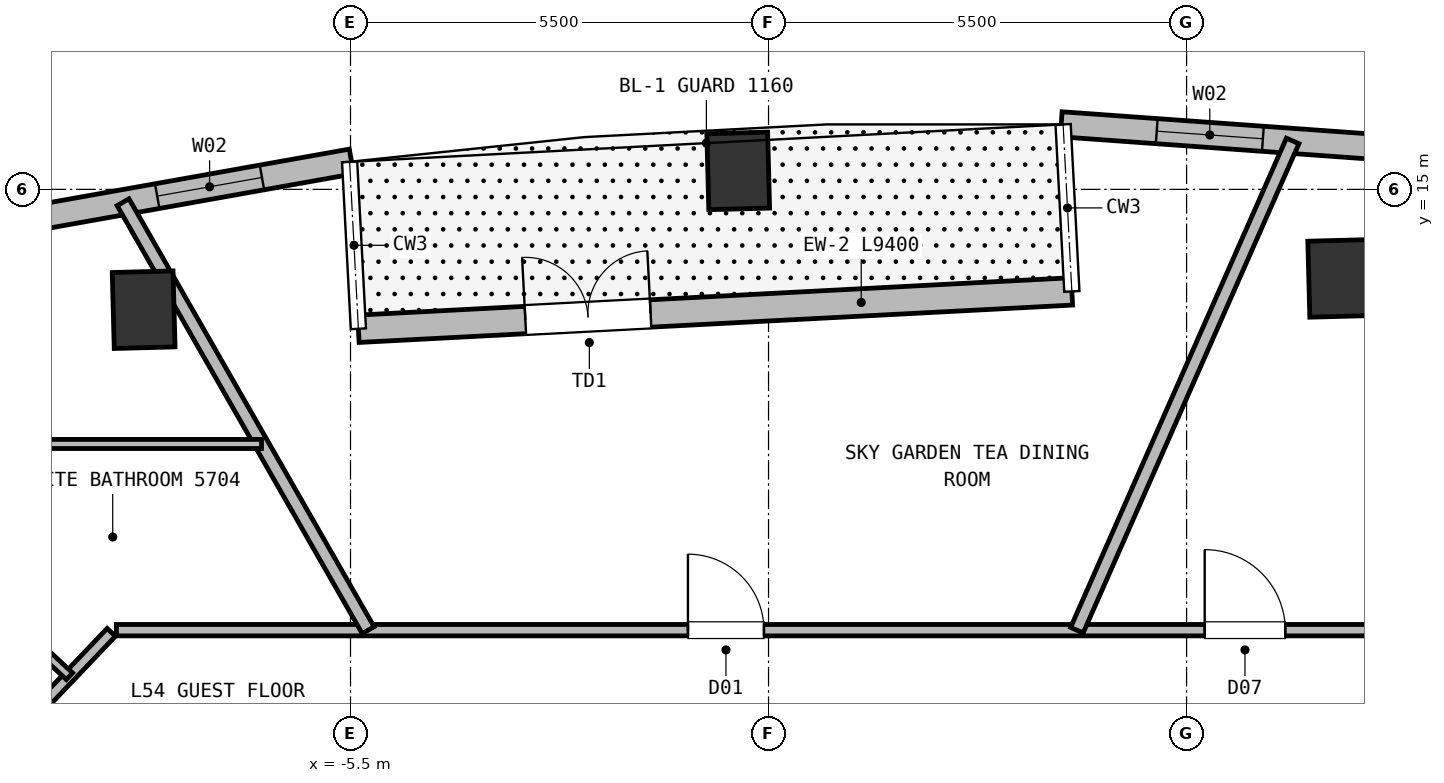
"""IFC4 building model, lengths in metres.
Left out: names, types, materials, properties, quantities, classifications, styles, units other than length and angle.
Written with IfcOpenShell. Run it as: python <this file> out.ifc"""

import sys

from ifc_helpers import new_model, si_unit, direction, frame, frame_2d, origin, origin_2d, place, context, subcontext, project, spatial, rectangle, extrude, element, fill, save


model = new_model("IFC4")
c1 = context("Model", 3, precision=1e-05, world=origin(), true_north=direction((0.0, 1.0)))
c2 = subcontext(c1, "Body", "Model", "MODEL_VIEW")
j1 = project(units=[si_unit("LENGTHUNIT", "METRE"), si_unit("PLANEANGLEUNIT", "RADIAN")], contexts=[c1])
p1 = place(None, origin())
s1 = spatial("IfcSite", under=j1, at=p1, CompositionType="ELEMENT")
p2 = place(p1, origin())
s2 = spatial("IfcBuilding", under=s1, at=p2, CompositionType="ELEMENT")
p3 = place(p2, frame((0.0, 0.0, 216.95)))
s3 = spatial("IfcBuildingStorey", under=s2, at=p3, CompositionType="ELEMENT", Elevation=216.95)
for number, where, z_axis, x_axis in (
    (1, (7.508, 13.828, 0.0), (0.0, 0.0, 1.0), (1.0, 0.026, 0.0)),
    (2, (-0.399, 15.243, 0.0), (0.0, 0.0, 1.0), (1.0, 0.026, 0.0)),
    (3, (-8.222, 13.417, 0.0), (0.0, 0.0, 1.0), (1.0, 0.026, 0.0)),
):
    element("IfcColumn", number, at=place(p3, frame(where, z_axis=z_axis, x_axis=x_axis)), inside=s3, PredefinedType="COLUMN", context=c2, shape_type="SweptSolid", body=[
        extrude(rectangle(XDim=0.8, YDim=1.0, at=origin_2d()), origin(), (0.0, 0.0, 1.0), 3.8),
    ])
p4 = place(p3, frame((-5.396, 13.166, 0.0), z_axis=(0.0, 0.0, 1.0), x_axis=(0.998629642142, 0.052333907124, 0.0)))
e4 = element("IfcWall", 4, at=p4, inside=s3, PredefinedType="SOLIDWALL", context=c2, shape_type="SweptSolid", body=[
    extrude(rectangle(XDim=9.4, YDim=0.36, at=frame_2d((4.7, 0.0))), origin(), (0.0, 0.0, 1.0), 3.55),
])
p5 = place(p4, frame((2.2, 0.0, 0.0)))
e5 = element("IfcOpeningElement", 5, at=p5, cuts=e4, PredefinedType="OPENING", context=c2, shape_type="SweptSolid", body=[
    extrude(rectangle(XDim=1.65, YDim=2.25, at=frame_2d((0.825, 1.125))), frame((0.0, 0.19, 0.0), z_axis=(0.0, -1.0, 0.0), x_axis=(1.0, 0.0, 0.0)), (0.0, 0.0, 1.0), 0.38),
])
p6 = place(p3, frame((3.851, 15.856, 0.0), z_axis=(0.0, 0.0, 1.0), x_axis=(0.997423966596, -0.071731658697, 0.0)))
e6 = element("IfcWall", 6, at=p6, inside=s3, PredefinedType="SOLIDWALL", context=c2, shape_type="SweptSolid", body=[
    extrude(rectangle(XDim=5.657, YDim=0.33, at=frame_2d((2.828, 0.0))), origin(), (0.0, 0.0, 1.0), 3.55),
])
p7 = place(p6, frame((1.26, 0.0, 0.72)))
e7 = element("IfcOpeningElement", 7, at=p7, cuts=e6, PredefinedType="OPENING", context=c2, shape_type="SweptSolid", body=[
    extrude(rectangle(XDim=1.4, YDim=1.88, at=frame_2d((0.7, 0.94))), frame((0.0, 0.175, 0.0), z_axis=(0.0, -1.0, 0.0), x_axis=(1.0, 0.0, 0.0)), (0.0, 0.0, 1.0), 0.35),
])
p8 = place(p3, frame((-11.056, 14.374, 0.0), z_axis=(0.0, 0.0, 1.0), x_axis=(0.984457704332, 0.17562183344, 0.0)))
e8 = element("IfcWall", 8, at=p8, inside=s3, PredefinedType="SOLIDWALL", context=c2, shape_type="SweptSolid", body=[
    extrude(rectangle(XDim=5.656, YDim=0.33, at=frame_2d((2.828, 0.0))), origin(), (0.0, 0.0, 1.0), 3.55),
])
p9 = place(p8, frame((3.06, 0.0, 0.72)))
e9 = element("IfcOpeningElement", 9, at=p9, cuts=e8, PredefinedType="OPENING", context=c2, shape_type="SweptSolid", body=[
    extrude(rectangle(XDim=1.4, YDim=1.88, at=frame_2d((0.7, 0.94))), frame((0.0, 0.175, 0.0), z_axis=(0.0, -1.0, 0.0), x_axis=(1.0, 0.0, 0.0)), (0.0, 0.0, 1.0), 0.35),
])
p10 = place(p3, frame((-8.58, 9.2, 0.0), z_axis=(0.0, 0.0, 1.0), x_axis=(1.0, 0.0, 0.0)))
e10 = element("IfcWall", 10, at=p10, inside=s3, PredefinedType="PARTITIONING", context=c2, shape_type="SweptSolid", body=[
    extrude(rectangle(XDim=17.16, YDim=0.15, at=frame_2d((8.58, 0.0))), origin(), (0.0, 0.0, 1.0), 3.55),
])
p11 = place(p10, frame((7.52, 0.0, 0.0)))
e11 = element("IfcOpeningElement", 11, at=p11, cuts=e10, PredefinedType="OPENING", context=c2, shape_type="SweptSolid", body=[
    extrude(rectangle(XDim=1.0, YDim=2.15, at=frame_2d((0.5, 1.075))), frame((0.0, 0.085, 0.0), z_axis=(0.0, -1.0, 0.0), x_axis=(1.0, 0.0, 0.0)), (0.0, 0.0, 1.0), 0.17),
])
p12 = place(p10, frame((14.319, 0.0, 0.0)))
e12 = element("IfcOpeningElement", 12, at=p12, cuts=e10, PredefinedType="OPENING", context=c2, shape_type="SweptSolid", body=[
    extrude(rectangle(XDim=1.06, YDim=2.15, at=frame_2d((0.53, 1.075))), frame((0.0, 0.085, 0.0), z_axis=(0.0, -1.0, 0.0), x_axis=(1.0, 0.0, 0.0)), (0.0, 0.0, 1.0), 0.17),
])
p13 = place(p3, frame((-10.422, 7.309, 0.0), z_axis=(0.0, 0.0, 1.0), x_axis=(0.689960858356, 0.723846678473, 0.0)))
e13 = element("IfcWall", 13, at=p13, inside=s3, PredefinedType="PARTITIONING", context=c2, shape_type="SweptSolid", body=[
    extrude(rectangle(XDim=2.572, YDim=0.15, at=frame_2d((1.286, 0.0))), origin(), (0.0, 0.0, 1.0), 3.55),
])
p14 = place(p3, frame((4.057, 9.2, 0.0), z_axis=(0.0, 0.0, 1.0), x_axis=(0.403480435419, 0.914988272184, 0.0)))
e14 = element("IfcWall", 14, at=p14, inside=s3, PredefinedType="PARTITIONING", context=c2, shape_type="SweptSolid", body=[
    extrude(rectangle(XDim=7.035, YDim=0.18, at=frame_2d((3.518, 0.0))), origin(), (0.0, 0.0, 1.0), 3.55),
])
p15 = place(p3, frame((-5.268, 9.2, 0.0), z_axis=(0.0, 0.0, 1.0), x_axis=(-0.496920769896, 0.867795914052, 0.0)))
e15 = element("IfcWall", 15, at=p15, inside=s3, PredefinedType="PARTITIONING", context=c2, shape_type="SweptSolid", body=[
    extrude(rectangle(XDim=6.489, YDim=0.18, at=frame_2d((3.244, 0.0))), origin(), (0.0, 0.0, 1.0), 3.55),
])
p16 = place(p3, frame((-9.198, 8.594, 0.0), z_axis=(0.0, 0.0, 1.0), x_axis=(-0.730664159642, 0.682737054666, 0.0)))
e16 = element("IfcWall", 16, at=p16, inside=s3, PredefinedType="PARTITIONING", context=c2, shape_type="SweptSolid", body=[
    extrude(rectangle(XDim=2.45, YDim=0.12, at=frame_2d((1.225, 0.0))), origin(), (0.0, 0.0, 1.0), 3.55),
])
p17 = place(p16, frame((0.765, 0.0, 0.0)))
e17 = element("IfcOpeningElement", 17, at=p17, cuts=e16, PredefinedType="OPENING", context=c2, shape_type="SweptSolid", body=[
    extrude(rectangle(XDim=0.92, YDim=2.1, at=frame_2d((0.46, 1.05))), frame((0.0, 0.07, 0.0), z_axis=(0.0, -1.0, 0.0), x_axis=(1.0, 0.0, 0.0)), (0.0, 0.0, 1.0), 0.14),
])
p18 = place(p3, frame((-6.671, 11.65, 0.0), z_axis=(0.0, 0.0, 1.0), x_axis=(-1.0, 0.0, 0.0)))
e18 = element("IfcWall", 18, at=p18, inside=s3, PredefinedType="PARTITIONING", context=c2, shape_type="SweptSolid", body=[
    extrude(rectangle(XDim=2.999, YDim=0.12, at=frame_2d((1.499, 0.0))), origin(), (0.0, 0.0, 1.0), 3.55),
])
p19 = place(p5, origin())
e19 = element("IfcDoor", 19, at=p19, inside=s3, OperationType="DOUBLE_DOOR_SINGLE_SWING", PredefinedType="DOOR", context=c2, shape_type="SweptSolid", body=[
    extrude(rectangle(XDim=1.65, YDim=2.25, at=frame_2d((0.825, 1.125))), frame((0.0, 0.025, 0.0), z_axis=(0.0, -1.0, 0.0), x_axis=(1.0, 0.0, 0.0)), (0.0, 0.0, 1.0), 0.05),
])
fill(e5, e19)
p20 = place(p7, origin())
e20 = element("IfcWindow", 20, at=p20, inside=s3, PartitioningType="SINGLE_PANEL", PredefinedType="WINDOW", context=c2, shape_type="SweptSolid", body=[
    extrude(rectangle(XDim=1.4, YDim=1.88, at=frame_2d((0.7, 0.94))), frame((0.0, 0.03, 0.0), z_axis=(0.0, -1.0, 0.0), x_axis=(1.0, 0.0, 0.0)), (0.0, 0.0, 1.0), 0.06),
])
fill(e7, e20)
p21 = place(p9, origin())
e21 = element("IfcWindow", 21, at=p21, inside=s3, PartitioningType="SINGLE_PANEL", PredefinedType="WINDOW", context=c2, shape_type="SweptSolid", body=[
    extrude(rectangle(XDim=1.4, YDim=1.88, at=frame_2d((0.7, 0.94))), frame((0.0, 0.03, 0.0), z_axis=(0.0, -1.0, 0.0), x_axis=(1.0, 0.0, 0.0)), (0.0, 0.0, 1.0), 0.06),
])
fill(e9, e21)
p22 = place(p11, origin())
e22 = element("IfcDoor", 22, at=p22, inside=s3, OperationType="SINGLE_SWING_LEFT", PredefinedType="DOOR", context=c2, shape_type="SweptSolid", body=[
    extrude(rectangle(XDim=1.0, YDim=2.15, at=frame_2d((0.5, 1.075))), frame((0.0, 0.025, 0.0), z_axis=(0.0, -1.0, 0.0), x_axis=(1.0, 0.0, 0.0)), (0.0, 0.0, 1.0), 0.05),
])
fill(e11, e22)
p23 = place(p12, origin())
e23 = element("IfcDoor", 23, at=p23, inside=s3, OperationType="SINGLE_SWING_LEFT", PredefinedType="DOOR", context=c2, shape_type="SweptSolid", body=[
    extrude(rectangle(XDim=1.06, YDim=2.15, at=frame_2d((0.53, 1.075))), frame((0.0, 0.025, 0.0), z_axis=(0.0, -1.0, 0.0), x_axis=(1.0, 0.0, 0.0)), (0.0, 0.0, 1.0), 0.05),
])
fill(e12, e23)
save(model, sys.argv[1])
